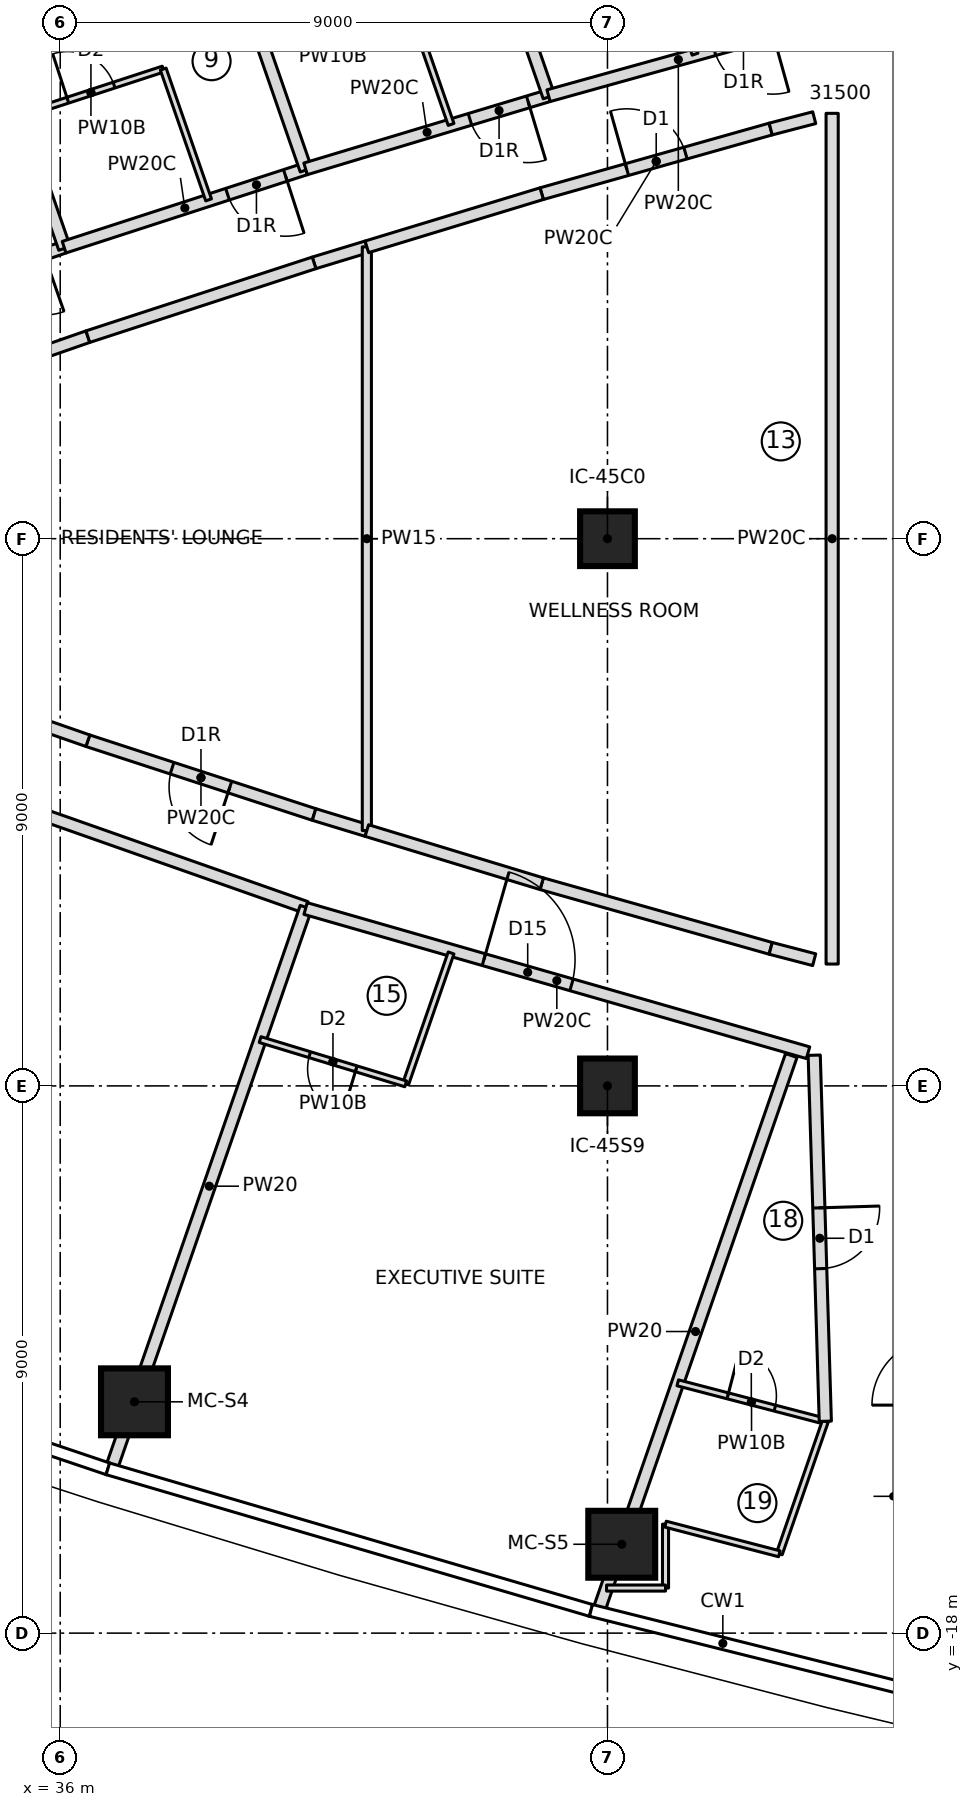
"""IFC4 building model, lengths in metres.
Left out: names, types, materials, properties, quantities, classifications, styles, units other than length and angle.
Written with IfcOpenShell. Run it as: python <this file> out.ifc"""

import sys

from ifc_helpers import new_model, si_unit, direction, frame, frame_2d, origin, origin_2d, place, context, subcontext, project, spatial, rectangle, extrude, element, fill, save


model = new_model("IFC4")
c1 = context("Model", 3, precision=1e-05, world=origin(), true_north=direction((0.0, 1.0)))
c2 = subcontext(c1, "Body", "Model", "MODEL_VIEW")
j1 = project(units=[si_unit("LENGTHUNIT", "METRE"), si_unit("PLANEANGLEUNIT", "RADIAN")], contexts=[c1])
p1 = place(None, origin())
s1 = spatial("IfcSite", under=j1, at=p1, CompositionType="ELEMENT")
p2 = place(p1, origin())
s2 = spatial("IfcBuilding", under=s1, at=p2, CompositionType="ELEMENT")
p3 = place(p2, frame((0.0, 0.0, 285.65)))
s3 = spatial("IfcBuildingStorey", under=s2, at=p3, CompositionType="ELEMENT", Elevation=285.65)
for number, where, z_axis, x_axis in (
    (1, (37.221, -14.196, 0.0), (0.0, 0.0, 1.0), (1.0, 0.0, 0.0)),
    (2, (45.235, -16.539, 0.0), (0.0, 0.0, 1.0), (1.0, 0.0, 0.0)),
):
    element("IfcColumn", number, at=place(p3, frame(where, z_axis=z_axis, x_axis=x_axis)), inside=s3, PredefinedType="COLUMN", context=c2, shape_type="SweptSolid", body=[
        extrude(rectangle(XDim=1.1, YDim=1.1, at=origin_2d()), origin(), (0.0, 0.0, 1.0), 3.55),
    ])
for number, where, z_axis, x_axis in (
    (3, (45.0, -9.0, 0.0), (0.0, 0.0, 1.0), (1.0, 0.0, 0.0)),
    (4, (45.0, 0.0, 0.0), (0.0, 0.0, 1.0), (1.0, 0.0, 0.0)),
):
    element("IfcColumn", number, at=place(p3, frame(where, z_axis=z_axis, x_axis=x_axis)), inside=s3, PredefinedType="COLUMN", context=c2, shape_type="SweptSolid", body=[
        extrude(rectangle(XDim=0.9, YDim=0.9, at=origin_2d()), origin(), (0.0, 0.0, 1.0), 3.55),
    ])
p4 = place(p3, frame((36.064, 4.794, 0.0), z_axis=(0.0, 0.0, 1.0), x_axis=(-0.944236129554, -0.329269086986, 0.0)))
e5 = element("IfcWall", 5, at=p4, inside=s3, PredefinedType="PARTITIONING", context=c2, shape_type="SweptSolid", body=[
    extrude(rectangle(XDim=4.174, YDim=0.2, at=frame_2d((2.087, 0.0))), origin(), (0.0, 0.0, 1.0), 3.25),
])
p5 = place(p4, frame((0.35, 0.0, 0.0)))
e6 = element("IfcOpeningElement", 6, at=p5, cuts=e5, PredefinedType="OPENING", context=c2, shape_type="SweptSolid", body=[
    extrude(rectangle(XDim=1.0, YDim=2.1, at=frame_2d((0.5, 1.05))), frame((0.0, 0.11, 0.0), z_axis=(0.0, -1.0, 0.0), x_axis=(1.0, 0.0, 0.0)), (0.0, 0.0, 1.0), 0.22),
])
p6 = place(p3, frame((36.071, 4.775, 0.0), z_axis=(0.0, 0.0, 1.0), x_axis=(-0.327725028322, 0.94477315045, 0.0)))
e7 = element("IfcWall", 7, at=p6, inside=s3, PredefinedType="PARTITIONING", context=c2, shape_type="SweptSolid", body=[
    extrude(rectangle(XDim=9.702, YDim=0.2, at=frame_2d((4.851, 0.0))), origin(), (0.0, 0.0, 1.0), 3.25),
])
p7 = place(p3, frame((40.035, 6.083, 0.0), z_axis=(0.0, 0.0, 1.0), x_axis=(-0.951196378796, -0.308586209941, 0.0)))
e8 = element("IfcWall", 8, at=p7, inside=s3, PredefinedType="PARTITIONING", context=c2, shape_type="SweptSolid", body=[
    extrude(rectangle(XDim=4.175, YDim=0.2, at=frame_2d((2.087, 0.0))), origin(), (0.0, 0.0, 1.0), 3.25),
])
p8 = place(p7, frame((0.35, 0.0, 0.0)))
e9 = element("IfcOpeningElement", 9, at=p8, cuts=e8, PredefinedType="OPENING", context=c2, shape_type="SweptSolid", body=[
    extrude(rectangle(XDim=1.0, YDim=2.1, at=frame_2d((0.5, 1.05))), frame((0.0, 0.11, 0.0), z_axis=(0.0, -1.0, 0.0), x_axis=(1.0, 0.0, 0.0)), (0.0, 0.0, 1.0), 0.22),
])
p9 = place(p3, frame((35.317, 6.948, 0.0), z_axis=(0.0, 0.0, 1.0), x_axis=(0.950666002187, 0.310216299194, 0.0)))
e10 = element("IfcWall", 10, at=p9, inside=s3, PredefinedType="PARTITIONING", context=c2, shape_type="SweptSolid", body=[
    extrude(rectangle(XDim=2.5, YDim=0.1, at=frame_2d((1.25, 0.0))), origin(), (0.0, 0.0, 1.0), 3.25),
])
p10 = place(p9, frame((0.85, 0.0, 0.0)))
e11 = element("IfcOpeningElement", 11, at=p10, cuts=e10, PredefinedType="OPENING", context=c2, shape_type="SweptSolid", body=[
    extrude(rectangle(XDim=0.8, YDim=2.1, at=frame_2d((0.4, 1.05))), frame((0.0, 0.06, 0.0), z_axis=(0.0, -1.0, 0.0), x_axis=(1.0, 0.0, 0.0)), (0.0, 0.0, 1.0), 0.12),
])
p11 = place(p3, frame((37.694, 7.724, 0.0), z_axis=(0.0, 0.0, 1.0), x_axis=(0.327622330203, -0.944808768351, 0.0)))
e12 = element("IfcWall", 12, at=p11, inside=s3, PredefinedType="PARTITIONING", context=c2, shape_type="SweptSolid", body=[
    extrude(rectangle(XDim=2.277, YDim=0.1, at=frame_2d((1.139, 0.0))), origin(), (0.0, 0.0, 1.0), 3.25),
])
p12 = place(p3, frame((40.042, 6.064, 0.0), z_axis=(0.0, 0.0, 1.0), x_axis=(-0.327710853631, 0.944778067279, 0.0)))
e13 = element("IfcWall", 13, at=p12, inside=s3, PredefinedType="PARTITIONING", context=c2, shape_type="SweptSolid", body=[
    extrude(rectangle(XDim=9.707, YDim=0.2, at=frame_2d((4.854, 0.0))), origin(), (0.0, 0.0, 1.0), 3.25),
])
p13 = place(p3, frame((44.031, 7.286, 0.0), z_axis=(0.0, 0.0, 1.0), x_axis=(-0.957521424208, -0.288362137222, 0.0)))
e14 = element("IfcWall", 14, at=p13, inside=s3, PredefinedType="PARTITIONING", context=c2, shape_type="SweptSolid", body=[
    extrude(rectangle(XDim=4.173, YDim=0.2, at=frame_2d((2.086, 0.0))), origin(), (0.0, 0.0, 1.0), 3.25),
])
p14 = place(p13, frame((0.35, 0.0, 0.0)))
e15 = element("IfcOpeningElement", 15, at=p14, cuts=e14, PredefinedType="OPENING", context=c2, shape_type="SweptSolid", body=[
    extrude(rectangle(XDim=1.0, YDim=2.1, at=frame_2d((0.5, 1.05))), frame((0.0, 0.11, 0.0), z_axis=(0.0, -1.0, 0.0), x_axis=(1.0, 0.0, 0.0)), (0.0, 0.0, 1.0), 0.22),
])
p15 = place(p3, frame((41.681, 8.966, 0.0), z_axis=(0.0, 0.0, 1.0), x_axis=(0.327743427431, -0.944766767925, 0.0)))
e16 = element("IfcWall", 16, at=p15, inside=s3, PredefinedType="PARTITIONING", context=c2, shape_type="SweptSolid", body=[
    extrude(rectangle(XDim=2.279, YDim=0.1, at=frame_2d((1.139, 0.0))), origin(), (0.0, 0.0, 1.0), 3.25),
])
p16 = place(p3, frame((44.038, 7.267, 0.0), z_axis=(0.0, 0.0, 1.0), x_axis=(-0.327714576096, 0.944776776077, 0.0)))
e17 = element("IfcWall", 17, at=p16, inside=s3, PredefinedType="PARTITIONING", context=c2, shape_type="SweptSolid", body=[
    extrude(rectangle(XDim=9.717, YDim=0.2, at=frame_2d((4.858, 0.0))), origin(), (0.0, 0.0, 1.0), 3.25),
])
p17 = place(p3, frame((48.299, 8.473, 0.0), z_axis=(0.0, 0.0, 1.0), x_axis=(-0.96343417102, -0.267945140115, 0.0)))
e18 = element("IfcWall", 18, at=p17, inside=s3, PredefinedType="PARTITIONING", context=c2, shape_type="SweptSolid", body=[
    extrude(rectangle(XDim=4.43, YDim=0.2, at=frame_2d((2.215, 0.0))), origin(), (0.0, 0.0, 1.0), 3.25),
])
p18 = place(p17, frame((0.603, 0.0, 0.0)))
e19 = element("IfcOpeningElement", 19, at=p18, cuts=e18, PredefinedType="OPENING", context=c2, shape_type="SweptSolid", body=[
    extrude(rectangle(XDim=1.0, YDim=2.1, at=frame_2d((0.5, 1.05))), frame((0.0, 0.11, 0.0), z_axis=(0.0, -1.0, 0.0), x_axis=(1.0, 0.0, 0.0)), (0.0, 0.0, 1.0), 0.22),
])
p19 = place(p3, frame((45.693, 10.124, 0.0), z_axis=(0.0, 0.0, 1.0), x_axis=(0.327764902685, -0.944759317799, 0.0)))
e20 = element("IfcWall", 20, at=p19, inside=s3, PredefinedType="PARTITIONING", context=c2, shape_type="SweptSolid", body=[
    extrude(rectangle(XDim=2.281, YDim=0.1, at=frame_2d((1.14, 0.0))), origin(), (0.0, 0.0, 1.0), 3.25),
])
p20 = place(p3, frame((26.85, -1.423, 0.0), z_axis=(0.0, 0.0, 1.0), x_axis=(0.943328585164, -0.331860182022, 0.0)))
e21 = element("IfcWall", 21, at=p20, inside=s3, PredefinedType="PARTITIONING", context=c2, shape_type="SweptSolid", body=[
    extrude(rectangle(XDim=13.984, YDim=0.2, at=frame_2d((6.992, 0.0))), origin(), (0.0, 0.0, 1.0), 3.25),
])
p21 = place(p20, frame((3.05, 0.0, 0.0)))
e22 = element("IfcOpeningElement", 22, at=p21, cuts=e21, PredefinedType="OPENING", context=c2, shape_type="SweptSolid", body=[
    extrude(rectangle(XDim=1.5, YDim=2.1, at=frame_2d((0.75, 1.05))), frame((0.0, 0.11, 0.0), z_axis=(0.0, -1.0, 0.0), x_axis=(1.0, 0.0, 0.0)), (0.0, 0.0, 1.0), 0.22),
])
p22 = place(p3, frame((36.861, -15.235, 0.0), z_axis=(0.0, 0.0, 1.0), x_axis=(0.327710853631, 0.944778067279, 0.0)))
e23 = element("IfcWall", 23, at=p22, inside=s3, PredefinedType="PARTITIONING", context=c2, shape_type="SweptSolid", body=[
    extrude(rectangle(XDim=9.707, YDim=0.2, at=frame_2d((4.854, 0.0))), origin(), (0.0, 0.0, 1.0), 3.25),
])
p23 = place(p3, frame((40.035, -6.083, 0.0), z_axis=(0.0, 0.0, 1.0), x_axis=(0.961195333593, -0.275868683759, 0.0)))
e24 = element("IfcWall", 24, at=p23, inside=s3, PredefinedType="PARTITIONING", context=c2, shape_type="SweptSolid", body=[
    extrude(rectangle(XDim=8.597, YDim=0.2, at=frame_2d((4.298, 0.0))), origin(), (0.0, 0.0, 1.0), 3.25),
])
p24 = place(p23, frame((3.05, 0.0, 0.0)))
e25 = element("IfcOpeningElement", 25, at=p24, cuts=e24, PredefinedType="OPENING", context=c2, shape_type="SweptSolid", body=[
    extrude(rectangle(XDim=1.5, YDim=2.1, at=frame_2d((0.75, 1.05))), frame((0.0, 0.11, 0.0), z_axis=(0.0, -1.0, 0.0), x_axis=(1.0, 0.0, 0.0)), (0.0, 0.0, 1.0), 0.22),
])
p25 = place(p3, frame((42.428, -6.813, 0.0), z_axis=(0.0, 0.0, 1.0), x_axis=(-0.327743427431, -0.944766767925, 0.0)))
e26 = element("IfcWall", 26, at=p25, inside=s3, PredefinedType="PARTITIONING", context=c2, shape_type="SweptSolid", body=[
    extrude(rectangle(XDim=2.279, YDim=0.1, at=frame_2d((1.139, 0.0))), origin(), (0.0, 0.0, 1.0), 3.25),
])
p26 = place(p3, frame((41.681, -8.966, 0.0), z_axis=(0.0, 0.0, 1.0), x_axis=(-0.956723503196, 0.290998519638, 0.0)))
e27 = element("IfcWall", 27, at=p26, inside=s3, PredefinedType="PARTITIONING", context=c2, shape_type="SweptSolid", body=[
    extrude(rectangle(XDim=2.502, YDim=0.1, at=frame_2d((1.251, 0.0))), origin(), (0.0, 0.0, 1.0), 3.25),
])
p27 = place(p26, frame((0.85, 0.0, 0.0)))
e28 = element("IfcOpeningElement", 28, at=p27, cuts=e27, PredefinedType="OPENING", context=c2, shape_type="SweptSolid", body=[
    extrude(rectangle(XDim=0.8, YDim=2.1, at=frame_2d((0.4, 1.05))), frame((0.0, 0.06, 0.0), z_axis=(0.0, -1.0, 0.0), x_axis=(1.0, 0.0, 0.0)), (0.0, 0.0, 1.0), 0.12),
])
p28 = place(p3, frame((44.874, -17.579, 0.0), z_axis=(0.0, 0.0, 1.0), x_axis=(0.327705598625, 0.944779890043, 0.0)))
e29 = element("IfcWall", 29, at=p28, inside=s3, PredefinedType="PARTITIONING", context=c2, shape_type="SweptSolid", body=[
    extrude(rectangle(XDim=9.61, YDim=0.2, at=frame_2d((4.805, 0.0))), origin(), (0.0, 0.0, 1.0), 3.25),
])
p29 = place(p3, frame((45.955, -16.208, 0.0), z_axis=(0.0, 0.0, 1.0), x_axis=(0.0, -1.0, 0.0)))
e30 = element("IfcWall", 30, at=p29, inside=s3, PredefinedType="PARTITIONING", context=c2, shape_type="SweptSolid", body=[
    extrude(rectangle(XDim=1.051, YDim=0.1, at=frame_2d((0.525, 0.0))), origin(), (0.0, 0.0, 1.0), 3.25),
])
p30 = place(p3, frame((45.955, -17.259, 0.0), z_axis=(0.0, 0.0, 1.0), x_axis=(-1.0, 0.0, 0.0)))
e31 = element("IfcWall", 31, at=p30, inside=s3, PredefinedType="PARTITIONING", context=c2, shape_type="SweptSolid", body=[
    extrude(rectangle(XDim=0.97, YDim=0.1, at=frame_2d((0.485, 0.0))), origin(), (0.0, 0.0, 1.0), 3.25),
])
p31 = place(p3, frame((46.156, -13.883, 0.0), z_axis=(0.0, 0.0, 1.0), x_axis=(0.967665843663, -0.252235633897, 0.0)))
e32 = element("IfcWall", 32, at=p31, inside=s3, PredefinedType="PARTITIONING", context=c2, shape_type="SweptSolid", body=[
    extrude(rectangle(XDim=2.508, YDim=0.1, at=frame_2d((1.254, 0.0))), origin(), (0.0, 0.0, 1.0), 3.25),
])
p32 = place(p31, frame((0.85, 0.0, 0.0)))
e33 = element("IfcOpeningElement", 33, at=p32, cuts=e32, PredefinedType="OPENING", context=c2, shape_type="SweptSolid", body=[
    extrude(rectangle(XDim=0.8, YDim=2.1, at=frame_2d((0.4, 1.05))), frame((0.0, 0.06, 0.0), z_axis=(0.0, -1.0, 0.0), x_axis=(1.0, 0.0, 0.0)), (0.0, 0.0, 1.0), 0.12),
])
p33 = place(p3, frame((48.583, -14.516, 0.0), z_axis=(0.0, 0.0, 1.0), x_axis=(-0.327695604762, -0.944783356447, 0.0)))
e34 = element("IfcWall", 34, at=p33, inside=s3, PredefinedType="PARTITIONING", context=c2, shape_type="SweptSolid", body=[
    extrude(rectangle(XDim=2.307, YDim=0.1, at=frame_2d((1.154, 0.0))), origin(), (0.0, 0.0, 1.0), 3.25),
])
p34 = place(p3, frame((47.826, -16.696, 0.0), z_axis=(0.0, 0.0, 1.0), x_axis=(-0.967650770907, 0.25229345129, 0.0)))
e35 = element("IfcWall", 35, at=p34, inside=s3, PredefinedType="PARTITIONING", context=c2, shape_type="SweptSolid", body=[
    extrude(rectangle(XDim=1.934, YDim=0.1, at=frame_2d((0.967, 0.0))), origin(), (0.0, 0.0, 1.0), 3.25),
])
p35 = place(p3, frame((40.175, -4.536, 0.0), z_axis=(0.0, 0.0, 1.0), x_axis=(-0.950709849021, 0.310081897206, 0.0)))
e36 = element("IfcWall", 36, at=p35, inside=s3, PredefinedType="PARTITIONING", context=c2, shape_type="SweptSolid", body=[
    extrude(rectangle(XDim=3.913, YDim=0.2, at=frame_2d((1.957, 0.0))), origin(), (0.0, 0.0, 1.0), 3.25),
])
p36 = place(p35, frame((1.457, 0.0, 0.0)))
e37 = element("IfcOpeningElement", 37, at=p36, cuts=e36, PredefinedType="OPENING", context=c2, shape_type="SweptSolid", body=[
    extrude(rectangle(XDim=1.0, YDim=2.1, at=frame_2d((0.5, 1.05))), frame((0.0, 0.11, 0.0), z_axis=(0.0, -1.0, 0.0), x_axis=(1.0, 0.0, 0.0)), (0.0, 0.0, 1.0), 0.22),
])
for number, where, z_axis, x_axis in (
    (38, (40.175, 4.536, 0.0), (0.0, 0.0, 1.0), (0.957, 0.291, 0.0)),
    (39, (41.043, -4.8, 0.0), (0.0, 0.0, 1.0), (-0.957, 0.291, 0.0)),
):
    element("IfcWall", number, at=place(p3, frame(where, z_axis=z_axis, x_axis=x_axis)), inside=s3, PredefinedType="PARTITIONING", context=c2, shape_type="SweptSolid", body=[
        extrude(rectangle(XDim=0.907, YDim=0.2, at=frame_2d((0.454, 0.0))), origin(), (0.0, 0.0, 1.0), 3.25),
    ])
for number, where, z_axis, x_axis in (
    (40, (36.455, -3.323, 0.0), (0.0, 0.0, 1.0), (-0.944, 0.329, 0.0)),
    (41, (33.385, 2.253, 0.0), (0.0, 0.0, 1.0), (0.944, 0.329, 0.0)),
):
    element("IfcWall", number, at=place(p3, frame(where, z_axis=z_axis, x_axis=x_axis)), inside=s3, PredefinedType="PARTITIONING", context=c2, shape_type="SweptSolid", body=[
        extrude(rectangle(XDim=3.25, YDim=0.2, at=frame_2d((1.625, 0.0))), origin(), (0.0, 0.0, 1.0), 3.25),
    ])
p37 = place(p3, frame((36.455, 3.323, 0.0), z_axis=(0.0, 0.0, 1.0), x_axis=(0.950709849021, 0.310081897206, 0.0)))
e42 = element("IfcWall", 42, at=p37, inside=s3, PredefinedType="PARTITIONING", context=c2, shape_type="SweptSolid", body=[
    extrude(rectangle(XDim=3.913, YDim=0.2, at=frame_2d((1.957, 0.0))), origin(), (0.0, 0.0, 1.0), 3.25),
])
p38 = place(p3, frame((41.043, -4.8, 0.0), z_axis=(0.0, 0.0, 1.0), x_axis=(0.0, 1.0, 0.0)))
e43 = element("IfcWall", 43, at=p38, inside=s3, PredefinedType="PARTITIONING", context=c2, shape_type="SweptSolid", body=[
    extrude(rectangle(XDim=9.6, YDim=0.15, at=frame_2d((4.8, 0.0))), origin(), (0.0, 0.0, 1.0), 3.25),
])
p39 = place(p3, frame((43.918, 5.675, 0.0), z_axis=(0.0, 0.0, 1.0), x_axis=(0.962411212211, 0.271596499628, 0.0)))
e44 = element("IfcWall", 44, at=p39, inside=s3, PredefinedType="PARTITIONING", context=c2, shape_type="SweptSolid", body=[
    extrude(rectangle(XDim=3.913, YDim=0.2, at=frame_2d((1.957, 0.0))), origin(), (0.0, 0.0, 1.0), 3.25),
])
p40 = place(p39, frame((1.457, 0.0, 0.0)))
e45 = element("IfcOpeningElement", 45, at=p40, cuts=e44, PredefinedType="OPENING", context=c2, shape_type="SweptSolid", body=[
    extrude(rectangle(XDim=1.0, YDim=2.1, at=frame_2d((0.5, 1.05))), frame((0.0, 0.11, 0.0), z_axis=(0.0, -1.0, 0.0), x_axis=(1.0, 0.0, 0.0)), (0.0, 0.0, 1.0), 0.22),
])
p41 = place(p3, frame((47.684, -6.738, 0.0), z_axis=(0.0, 0.0, 1.0), x_axis=(-0.962411212211, 0.271596499628, 0.0)))
e46 = element("IfcWall", 46, at=p41, inside=s3, PredefinedType="PARTITIONING", context=c2, shape_type="SweptSolid", body=[
    extrude(rectangle(XDim=3.913, YDim=0.2, at=frame_2d((1.957, 0.0))), origin(), (0.0, 0.0, 1.0), 3.25),
])
for number, where, z_axis, x_axis in (
    (47, (43.918, -5.675, 0.0), (0.0, 0.0, 1.0), (-0.957, 0.291, 0.0)),
    (48, (41.043, 4.8, 0.0), (0.0, 0.0, 1.0), (0.957, 0.291, 0.0)),
):
    element("IfcWall", number, at=place(p3, frame(where, z_axis=z_axis, x_axis=x_axis)), inside=s3, PredefinedType="PARTITIONING", context=c2, shape_type="SweptSolid", body=[
        extrude(rectangle(XDim=3.006, YDim=0.2, at=frame_2d((1.503, 0.0))), origin(), (0.0, 0.0, 1.0), 3.25),
    ])
for number, where, z_axis, x_axis in (
    (49, (47.684, 6.738, 0.0), (0.0, 0.0, 1.0), (0.968, 0.253, 0.0)),
    (50, (48.4, -6.924, 0.0), (0.0, 0.0, 1.0), (-0.968, 0.253, 0.0)),
):
    element("IfcWall", number, at=place(p3, frame(where, z_axis=z_axis, x_axis=x_axis)), inside=s3, PredefinedType="PARTITIONING", context=c2, shape_type="SweptSolid", body=[
        extrude(rectangle(XDim=0.74, YDim=0.2, at=frame_2d((0.37, 0.0))), origin(), (0.0, 0.0, 1.0), 3.25),
    ])
p42 = place(p3, frame((48.4, -8.495, 0.0), z_axis=(0.0, 0.0, 1.0), x_axis=(0.030318578026, -0.999540286245, 0.0)))
e51 = element("IfcWall", 51, at=p42, inside=s3, PredefinedType="PARTITIONING", context=c2, shape_type="SweptSolid", body=[
    extrude(rectangle(XDim=6.023, YDim=0.2, at=frame_2d((3.012, 0.0))), origin(), (0.0, 0.0, 1.0), 3.25),
])
p43 = place(p42, frame((2.512, 0.0, 0.0)))
e52 = element("IfcOpeningElement", 52, at=p43, cuts=e51, PredefinedType="OPENING", context=c2, shape_type="SweptSolid", body=[
    extrude(rectangle(XDim=1.0, YDim=2.1, at=frame_2d((0.5, 1.05))), frame((0.0, 0.11, 0.0), z_axis=(0.0, -1.0, 0.0), x_axis=(1.0, 0.0, 0.0)), (0.0, 0.0, 1.0), 0.22),
])
p44 = place(p3, frame((48.695, 6.996, 0.0), z_axis=(0.0, 0.0, 1.0), x_axis=(0.0, -1.0, 0.0)))
e53 = element("IfcWall", 53, at=p44, inside=s3, PredefinedType="PARTITIONING", context=c2, shape_type="SweptSolid", body=[
    extrude(rectangle(XDim=13.992, YDim=0.2, at=frame_2d((6.996, 0.0))), origin(), (0.0, 0.0, 1.0), 3.25),
])
p45 = place(p10, origin())
e54 = element("IfcDoor", 54, at=p45, inside=s3, OperationType="SINGLE_SWING_LEFT", PredefinedType="DOOR", context=c2, shape_type="SweptSolid", body=[
    extrude(rectangle(XDim=0.8, YDim=2.1, at=frame_2d((0.4, 1.05))), frame((0.0, 0.025, 0.0), z_axis=(0.0, -1.0, 0.0), x_axis=(1.0, 0.0, 0.0)), (0.0, 0.0, 1.0), 0.05),
])
fill(e11, e54)
p46 = place(p8, origin())
e55 = element("IfcDoor", 55, at=p46, inside=s3, OperationType="SINGLE_SWING_RIGHT", PredefinedType="DOOR", context=c2, shape_type="SweptSolid", body=[
    extrude(rectangle(XDim=1.0, YDim=2.1, at=frame_2d((0.5, 1.05))), frame((0.0, 0.025, 0.0), z_axis=(0.0, -1.0, 0.0), x_axis=(1.0, 0.0, 0.0)), (0.0, 0.0, 1.0), 0.05),
])
fill(e9, e55)
p47 = place(p14, origin())
e56 = element("IfcDoor", 56, at=p47, inside=s3, OperationType="SINGLE_SWING_RIGHT", PredefinedType="DOOR", context=c2, shape_type="SweptSolid", body=[
    extrude(rectangle(XDim=1.0, YDim=2.1, at=frame_2d((0.5, 1.05))), frame((0.0, 0.025, 0.0), z_axis=(0.0, -1.0, 0.0), x_axis=(1.0, 0.0, 0.0)), (0.0, 0.0, 1.0), 0.05),
])
fill(e15, e56)
p48 = place(p27, origin())
e57 = element("IfcDoor", 57, at=p48, inside=s3, OperationType="SINGLE_SWING_LEFT", PredefinedType="DOOR", context=c2, shape_type="SweptSolid", body=[
    extrude(rectangle(XDim=0.8, YDim=2.1, at=frame_2d((0.4, 1.05))), frame((0.0, 0.025, 0.0), z_axis=(0.0, -1.0, 0.0), x_axis=(1.0, 0.0, 0.0)), (0.0, 0.0, 1.0), 0.05),
])
fill(e28, e57)
p49 = place(p24, origin())
e58 = element("IfcDoor", 58, at=p49, inside=s3, OperationType="DOUBLE_DOOR_SINGLE_SWING", PredefinedType="DOOR", context=c2, shape_type="SweptSolid", body=[
    extrude(rectangle(XDim=1.5, YDim=2.1, at=frame_2d((0.75, 1.05))), frame((0.0, 0.025, 0.0), z_axis=(0.0, -1.0, 0.0), x_axis=(1.0, 0.0, 0.0)), (0.0, 0.0, 1.0), 0.05),
])
fill(e25, e58)
p50 = place(p32, origin())
e59 = element("IfcDoor", 59, at=p50, inside=s3, OperationType="SINGLE_SWING_LEFT", PredefinedType="DOOR", context=c2, shape_type="SweptSolid", body=[
    extrude(rectangle(XDim=0.8, YDim=2.1, at=frame_2d((0.4, 1.05))), frame((0.0, 0.025, 0.0), z_axis=(0.0, -1.0, 0.0), x_axis=(1.0, 0.0, 0.0)), (0.0, 0.0, 1.0), 0.05),
])
fill(e33, e59)
p51 = place(p36, origin())
e60 = element("IfcDoor", 60, at=p51, inside=s3, OperationType="SINGLE_SWING_RIGHT", PredefinedType="DOOR", context=c2, shape_type="SweptSolid", body=[
    extrude(rectangle(XDim=1.0, YDim=2.1, at=frame_2d((0.5, 1.05))), frame((0.0, 0.025, 0.0), z_axis=(0.0, -1.0, 0.0), x_axis=(1.0, 0.0, 0.0)), (0.0, 0.0, 1.0), 0.05),
])
fill(e37, e60)
p52 = place(p40, origin())
e61 = element("IfcDoor", 61, at=p52, inside=s3, OperationType="SINGLE_SWING_LEFT", PredefinedType="DOOR", context=c2, shape_type="SweptSolid", body=[
    extrude(rectangle(XDim=1.0, YDim=2.1, at=frame_2d((0.5, 1.05))), frame((0.0, 0.025, 0.0), z_axis=(0.0, -1.0, 0.0), x_axis=(1.0, 0.0, 0.0)), (0.0, 0.0, 1.0), 0.05),
])
fill(e45, e61)
p53 = place(p43, origin())
e62 = element("IfcDoor", 62, at=p53, inside=s3, OperationType="SINGLE_SWING_LEFT", PredefinedType="DOOR", context=c2, shape_type="SweptSolid", body=[
    extrude(rectangle(XDim=1.0, YDim=2.1, at=frame_2d((0.5, 1.05))), frame((0.0, 0.025, 0.0), z_axis=(0.0, -1.0, 0.0), x_axis=(1.0, 0.0, 0.0)), (0.0, 0.0, 1.0), 0.05),
])
fill(e52, e62)
save(model, sys.argv[1])
